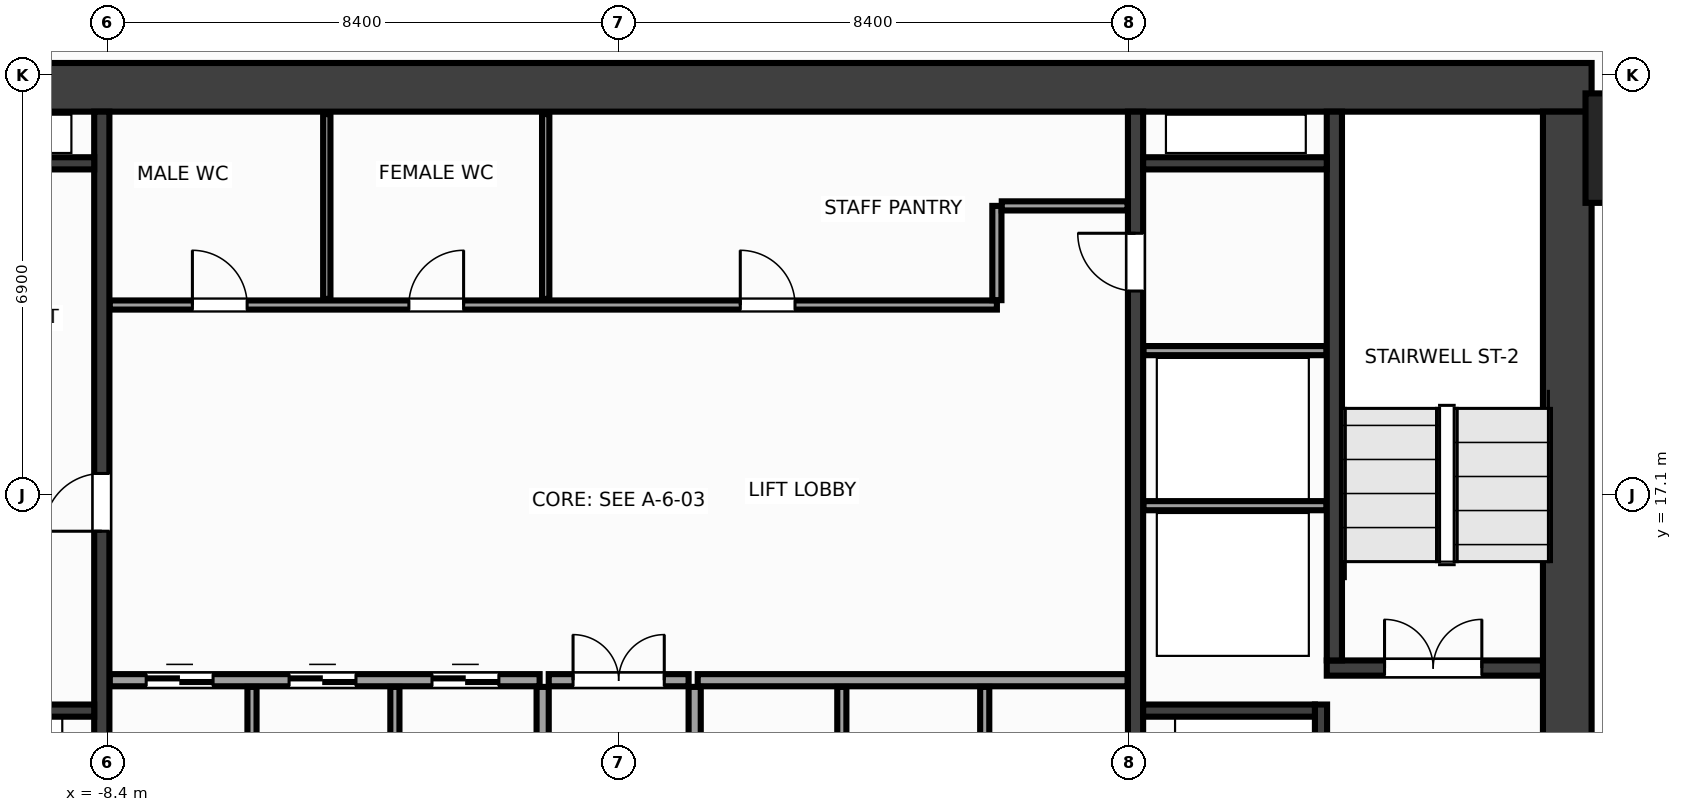
"""IFC4 building model, lengths in metres.
Left out: names, types, materials, properties, quantities, classifications, styles, units other than length and angle.
Written with IfcOpenShell. Run it as: python <this file> out.ifc"""

import sys

from ifc_helpers import new_model, si_unit, direction, frame, frame_2d, origin, origin_2d, place, context, subcontext, project, spatial, rectangle, extrude, source, transform, mapped, element, fill, save


model = new_model("IFC4")
c1 = context("Model", 3, precision=1e-05, world=origin(), true_north=direction((0.0, 1.0)))
c2 = subcontext(c1, "Body", "Model", "MODEL_VIEW")
j1 = project(units=[si_unit("LENGTHUNIT", "METRE"), si_unit("PLANEANGLEUNIT", "RADIAN")], contexts=[c1])
p1 = place(None, origin())
s1 = spatial("IfcSite", under=j1, at=p1, CompositionType="ELEMENT")
p2 = place(p1, origin())
s2 = spatial("IfcBuilding", under=s1, at=p2, CompositionType="ELEMENT")
p3 = place(p2, frame((0.0, 0.0, 66.8)))
s3 = spatial("IfcBuildingStorey", under=s2, at=p3, CompositionType="ELEMENT", Elevation=66.8)
m1 = source(origin(), c2, "Body", "SweptSolid", [
    extrude(rectangle(XDim=32.0, YDim=0.8, at=frame_2d((16.0, 0.0))), origin(), (0.0, 0.0, 1.0), 3.6),
])
p4 = place(p3, frame((-16.0, 23.8, 0.0), z_axis=(0.0, 0.0, 1.0), x_axis=(1.0, 0.0, 0.0)))
e1 = element("IfcWall", 1, at=p4, inside=s3, PredefinedType="SHEAR", context=c2, shape_type="MappedRepresentation", body=[
    mapped(m1, transform((0.0, 0.0, 0.0), x_axis=(1.0, 0.0, 0.0), y_axis=(0.0, 1.0, 0.0), z_axis=(0.0, 0.0, 1.0), scale=1.0)),
])
m2 = source(origin(), c2, "Body", "SweptSolid", [
    extrude(rectangle(XDim=12.8, YDim=0.8, at=frame_2d((6.4, 0.0))), origin(), (0.0, 0.0, 1.0), 3.6),
])
p5 = place(p3, frame((15.6, 10.6, 0.0), z_axis=(0.0, 0.0, 1.0), x_axis=(0.0, 1.0, 0.0)))
e2 = element("IfcWall", 2, at=p5, inside=s3, PredefinedType="SHEAR", context=c2, shape_type="MappedRepresentation", body=[
    mapped(m2, transform((0.0, 0.0, 0.0), x_axis=(1.0, 0.0, 0.0), y_axis=(0.0, 1.0, 0.0), z_axis=(0.0, 0.0, 1.0), scale=1.0)),
])
m3 = source(origin(), c2, "Body", "SweptSolid", [
    extrude(rectangle(XDim=12.8, YDim=0.25, at=frame_2d((6.4, 0.0))), origin(), (0.0, 0.0, 1.0), 3.6),
])
p6 = place(p3, frame((-8.5, 10.6, 0.0), z_axis=(0.0, 0.0, 1.0), x_axis=(0.0, 1.0, 0.0)))
e3 = element("IfcWall", 3, at=p6, inside=s3, PredefinedType="SHEAR", context=c2, shape_type="MappedRepresentation", body=[
    mapped(m3, transform((0.0, 0.0, 0.0), x_axis=(1.0, 0.0, 0.0), y_axis=(0.0, 1.0, 0.0), z_axis=(0.0, 0.0, 1.0), scale=1.0)),
])
p7 = place(p6, frame((5.9, 0.0, 0.0)))
e4 = element("IfcOpeningElement", 4, at=p7, cuts=e3, PredefinedType="OPENING", context=c2, shape_type="SweptSolid", body=[
    extrude(rectangle(XDim=0.95, YDim=2.15, at=frame_2d((0.475, 1.075))), frame((0.0, 0.137, 0.0), z_axis=(0.0, -1.0, 0.0), x_axis=(1.0, 0.0, 0.0)), (0.0, 0.0, 1.0), 0.274),
])
p8 = place(p3, frame((8.5, 10.6, 0.0), z_axis=(0.0, 0.0, 1.0), x_axis=(0.0, 1.0, 0.0)))
e5 = element("IfcWall", 5, at=p8, inside=s3, PredefinedType="SHEAR", context=c2, shape_type="MappedRepresentation", body=[
    mapped(m3, transform((0.0, 0.0, 0.0), x_axis=(1.0, 0.0, 0.0), y_axis=(0.0, 1.0, 0.0), z_axis=(0.0, 0.0, 1.0), scale=1.0)),
])
p9 = place(p8, frame((9.85, 0.0, 0.0)))
e6 = element("IfcOpeningElement", 6, at=p9, cuts=e5, PredefinedType="OPENING", context=c2, shape_type="SweptSolid", body=[
    extrude(rectangle(XDim=0.95, YDim=2.15, at=frame_2d((0.475, 1.075))), frame((0.0, 0.137, 0.0), z_axis=(0.0, -1.0, 0.0), x_axis=(1.0, 0.0, 0.0)), (0.0, 0.0, 1.0), 0.274),
])
m4 = source(origin(), c2, "Body", "SweptSolid", [
    extrude(rectangle(XDim=3.555, YDim=0.25, at=frame_2d((1.777, 0.0))), origin(), (0.0, 0.0, 1.0), 3.6),
])
p10 = place(p3, frame((11.645, 14.25, 0.0), z_axis=(0.0, 0.0, 1.0), x_axis=(1.0, 0.0, 0.0)))
e7 = element("IfcWall", 7, at=p10, inside=s3, PredefinedType="SHEAR", context=c2, shape_type="MappedRepresentation", body=[
    mapped(m4, transform((0.0, 0.0, 0.0), x_axis=(1.0, 0.0, 0.0), y_axis=(0.0, 1.0, 0.0), z_axis=(0.0, 0.0, 1.0), scale=1.0)),
])
p11 = place(p10, frame((0.95, 0.0, 0.0)))
e8 = element("IfcOpeningElement", 8, at=p11, cuts=e7, PredefinedType="OPENING", context=c2, shape_type="SweptSolid", body=[
    extrude(rectangle(XDim=1.6, YDim=2.15, at=frame_2d((0.8, 1.075))), frame((0.0, 0.137, 0.0), z_axis=(0.0, -1.0, 0.0), x_axis=(1.0, 0.0, 0.0)), (0.0, 0.0, 1.0), 0.274),
])
m5 = source(origin(), c2, "Body", "SweptSolid", [
    extrude(rectangle(XDim=9.025, YDim=0.25, at=frame_2d((4.512, 0.0))), origin(), (0.0, 0.0, 1.0), 3.6),
])
p12 = place(p3, frame((11.77, 14.375, 0.0), z_axis=(0.0, 0.0, 1.0), x_axis=(0.0, 1.0, 0.0)))
e9 = element("IfcWall", 9, at=p12, inside=s3, PredefinedType="SHEAR", context=c2, shape_type="MappedRepresentation", body=[
    mapped(m5, transform((0.0, 0.0, 0.0), x_axis=(1.0, 0.0, 0.0), y_axis=(0.0, 1.0, 0.0), z_axis=(0.0, 0.0, 1.0), scale=1.0)),
])
m6 = source(origin(), c2, "Body", "SweptSolid", [
    extrude(rectangle(XDim=2.825, YDim=0.2, at=frame_2d((1.413, 0.0))), origin(), (0.0, 0.0, 1.0), 3.6),
])
p13 = place(p3, frame((-11.45, 13.55, 0.0), z_axis=(0.0, 0.0, 1.0), x_axis=(1.0, 0.0, 0.0)))
e10 = element("IfcWall", 10, at=p13, inside=s3, PredefinedType="SHEAR", context=c2, shape_type="MappedRepresentation", body=[
    mapped(m6, transform((0.0, 0.0, 0.0), x_axis=(1.0, 0.0, 0.0), y_axis=(0.0, 1.0, 0.0), z_axis=(0.0, 0.0, 1.0), scale=1.0)),
])
m7 = source(origin(), c2, "Body", "SweptSolid", [
    extrude(rectangle(XDim=3.05, YDim=0.2, at=frame_2d((1.525, 0.0))), origin(), (0.0, 0.0, 1.0), 3.6),
])
p14 = place(p3, frame((11.55, 10.6, 0.0), z_axis=(0.0, 0.0, 1.0), x_axis=(0.0, 1.0, 0.0)))
e11 = element("IfcWall", 11, at=p14, inside=s3, PredefinedType="SHEAR", context=c2, shape_type="MappedRepresentation", body=[
    mapped(m7, transform((0.0, 0.0, 0.0), x_axis=(1.0, 0.0, 0.0), y_axis=(0.0, 1.0, 0.0), z_axis=(0.0, 0.0, 1.0), scale=1.0)),
])
p15 = place(p14, frame((0.9, 0.0, 0.0)))
e12 = element("IfcOpeningElement", 12, at=p15, cuts=e11, PredefinedType="OPENING", context=c2, shape_type="SweptSolid", body=[
    extrude(rectangle(XDim=1.1, YDim=2.15, at=frame_2d((0.55, 1.075))), frame((0.0, 0.112, 0.0), z_axis=(0.0, -1.0, 0.0), x_axis=(1.0, 0.0, 0.0)), (0.0, 0.0, 1.0), 0.224),
])
p16 = place(p3, frame((8.625, 13.55, 0.0), z_axis=(0.0, 0.0, 1.0), x_axis=(1.0, 0.0, 0.0)))
e13 = element("IfcWall", 13, at=p16, inside=s3, PredefinedType="SHEAR", context=c2, shape_type="MappedRepresentation", body=[
    mapped(m6, transform((0.0, 0.0, 0.0), x_axis=(1.0, 0.0, 0.0), y_axis=(0.0, 1.0, 0.0), z_axis=(0.0, 0.0, 1.0), scale=1.0)),
])
m8 = source(origin(), c2, "Body", "SweptSolid", [
    extrude(rectangle(XDim=3.02, YDim=0.2, at=frame_2d((1.51, 0.0))), origin(), (0.0, 0.0, 1.0), 3.6),
])
for number, where, z_axis, x_axis in (
    (14, (-11.645, 22.55, 0.0), (0.0, 0.0, 1.0), (1.0, 0.0, 0.0)),
    (15, (8.625, 22.55, 0.0), (0.0, 0.0, 1.0), (1.0, 0.0, 0.0)),
):
    element("IfcWall", number, at=place(p3, frame(where, z_axis=z_axis, x_axis=x_axis)), inside=s3, PredefinedType="SHEAR", context=c2, shape_type="MappedRepresentation", body=[
        mapped(m8, transform((0.0, 0.0, 0.0), x_axis=(1.0, 0.0, 0.0), y_axis=(0.0, 1.0, 0.0), z_axis=(0.0, 0.0, 1.0), scale=1.0)),
    ])
m9 = source(origin(), c2, "Body", "SweptSolid", [
    extrude(rectangle(XDim=1.8, YDim=1.8, at=origin_2d()), origin(), (0.0, 0.0, 1.0), 3.6),
])
p17 = place(p3, frame((16.8, 22.8, 0.0), z_axis=(0.0, 0.0, 1.0), x_axis=(1.0, 0.0, 0.0)))
e16 = element("IfcColumn", 16, at=p17, inside=s3, PredefinedType="COLUMN", context=c2, shape_type="MappedRepresentation", body=[
    mapped(m9, transform((0.0, 0.0, 0.0), x_axis=(1.0, 0.0, 0.0), y_axis=(0.0, 1.0, 0.0), z_axis=(0.0, 0.0, 1.0), scale=1.0)),
])
m10 = source(origin(), c2, "Body", "SweptSolid", [
    extrude(rectangle(XDim=3.01, YDim=0.15, at=frame_2d((1.505, 0.0))), origin(), (0.0, 0.0, 1.0), 3.3),
])
for number, where, z_axis, x_axis in (
    (17, (8.63, 16.92, 0.0), (0.0, 0.0, 1.0), (1.0, 0.0, 0.0)),
    (18, (8.63, 19.47, 0.0), (0.0, 0.0, 1.0), (1.0, 0.0, 0.0)),
):
    element("IfcWall", number, at=place(p3, frame(where, z_axis=z_axis, x_axis=x_axis)), inside=s3, PredefinedType="PARTITIONING", context=c2, shape_type="MappedRepresentation", body=[
        mapped(m10, transform((0.0, 0.0, 0.0), x_axis=(1.0, 0.0, 0.0), y_axis=(0.0, 1.0, 0.0), z_axis=(0.0, 0.0, 1.0), scale=1.0)),
    ])
m11 = source(origin(), c2, "Body", "SweptSolid", [
    extrude(rectangle(XDim=7.07, YDim=0.2, at=frame_2d((3.535, 0.0))), origin(), (0.0, 0.0, 1.0), 3.3),
])
p18 = place(p3, frame((-8.37, 14.05, 0.0), z_axis=(0.0, 0.0, 1.0), x_axis=(1.0, 0.0, 0.0)))
e19 = element("IfcWall", 19, at=p18, inside=s3, PredefinedType="PARTITIONING", context=c2, shape_type="MappedRepresentation", body=[
    mapped(m11, transform((0.0, 0.0, 0.0), x_axis=(1.0, 0.0, 0.0), y_axis=(0.0, 1.0, 0.0), z_axis=(0.0, 0.0, 1.0), scale=1.0)),
])
p19 = place(p18, frame((0.6, 0.0, 0.0)))
e20 = element("IfcOpeningElement", 20, at=p19, cuts=e19, PredefinedType="OPENING", context=c2, shape_type="SweptSolid", body=[
    extrude(rectangle(XDim=1.1, YDim=2.15, at=frame_2d((0.55, 1.075))), frame((0.0, 0.112, 0.0), z_axis=(0.0, -1.0, 0.0), x_axis=(1.0, 0.0, 0.0)), (0.0, 0.0, 1.0), 0.224),
])
p20 = place(p18, frame((2.95, 0.0, 0.0)))
e21 = element("IfcOpeningElement", 21, at=p20, cuts=e19, PredefinedType="OPENING", context=c2, shape_type="SweptSolid", body=[
    extrude(rectangle(XDim=1.1, YDim=2.15, at=frame_2d((0.55, 1.075))), frame((0.0, 0.112, 0.0), z_axis=(0.0, -1.0, 0.0), x_axis=(1.0, 0.0, 0.0)), (0.0, 0.0, 1.0), 0.224),
])
p21 = place(p18, frame((5.3, 0.0, 0.0)))
e22 = element("IfcOpeningElement", 22, at=p21, cuts=e19, PredefinedType="OPENING", context=c2, shape_type="SweptSolid", body=[
    extrude(rectangle(XDim=1.1, YDim=2.15, at=frame_2d((0.55, 1.075))), frame((0.0, 0.112, 0.0), z_axis=(0.0, -1.0, 0.0), x_axis=(1.0, 0.0, 0.0)), (0.0, 0.0, 1.0), 0.224),
])
p22 = place(p3, frame((1.3, 14.05, 0.0), z_axis=(0.0, 0.0, 1.0), x_axis=(1.0, 0.0, 0.0)))
e23 = element("IfcWall", 23, at=p22, inside=s3, PredefinedType="PARTITIONING", context=c2, shape_type="MappedRepresentation", body=[
    mapped(m11, transform((0.0, 0.0, 0.0), x_axis=(1.0, 0.0, 0.0), y_axis=(0.0, 1.0, 0.0), z_axis=(0.0, 0.0, 1.0), scale=1.0)),
])
m12 = source(origin(), c2, "Body", "SweptSolid", [
    extrude(rectangle(XDim=3.34, YDim=0.2, at=frame_2d((1.67, 0.0))), origin(), (0.0, 0.0, 1.0), 3.3),
])
for number, where, z_axis, x_axis in (
    (24, (-1.25, 10.6, 0.0), (0.0, 0.0, 1.0), (0.0, 1.0, 0.0)),
    (25, (1.25, 10.6, 0.0), (0.0, 0.0, 1.0), (0.0, 1.0, 0.0)),
):
    element("IfcWall", number, at=place(p3, frame(where, z_axis=z_axis, x_axis=x_axis)), inside=s3, PredefinedType="PARTITIONING", context=c2, shape_type="MappedRepresentation", body=[
        mapped(m12, transform((0.0, 0.0, 0.0), x_axis=(1.0, 0.0, 0.0), y_axis=(0.0, 1.0, 0.0), z_axis=(0.0, 0.0, 1.0), scale=1.0)),
    ])
m13 = source(origin(), c2, "Body", "SweptSolid", [
    extrude(rectangle(XDim=2.3, YDim=0.2, at=frame_2d((1.15, 0.0))), origin(), (0.0, 0.0, 1.0), 3.3),
])
p23 = place(p3, frame((-1.15, 14.05, 0.0), z_axis=(0.0, 0.0, 1.0), x_axis=(1.0, 0.0, 0.0)))
e26 = element("IfcWall", 26, at=p23, inside=s3, PredefinedType="PARTITIONING", context=c2, shape_type="MappedRepresentation", body=[
    mapped(m13, transform((0.0, 0.0, 0.0), x_axis=(1.0, 0.0, 0.0), y_axis=(0.0, 1.0, 0.0), z_axis=(0.0, 0.0, 1.0), scale=1.0)),
])
p24 = place(p23, frame((0.4, 0.0, 0.0)))
e27 = element("IfcOpeningElement", 27, at=p24, cuts=e26, PredefinedType="OPENING", context=c2, shape_type="SweptSolid", body=[
    extrude(rectangle(XDim=1.5, YDim=2.2, at=frame_2d((0.75, 1.1))), frame((0.0, 0.112, 0.0), z_axis=(0.0, -1.0, 0.0), x_axis=(1.0, 0.0, 0.0)), (0.0, 0.0, 1.0), 0.224),
])
m14 = source(origin(), c2, "Body", "SweptSolid", [
    extrude(rectangle(XDim=14.59, YDim=0.15, at=frame_2d((7.295, 0.0))), origin(), (0.0, 0.0, 1.0), 3.3),
])
p25 = place(p3, frame((-8.37, 20.22, 0.0), z_axis=(0.0, 0.0, 1.0), x_axis=(1.0, 0.0, 0.0)))
e28 = element("IfcWall", 28, at=p25, inside=s3, PredefinedType="PARTITIONING", context=c2, shape_type="MappedRepresentation", body=[
    mapped(m14, transform((0.0, 0.0, 0.0), x_axis=(1.0, 0.0, 0.0), y_axis=(0.0, 1.0, 0.0), z_axis=(0.0, 0.0, 1.0), scale=1.0)),
])
p26 = place(p25, frame((1.36, 0.0, 0.0)))
e29 = element("IfcOpeningElement", 29, at=p26, cuts=e28, PredefinedType="OPENING", context=c2, shape_type="SweptSolid", body=[
    extrude(rectangle(XDim=0.9, YDim=2.15, at=frame_2d((0.45, 1.075))), frame((0.0, 0.087, 0.0), z_axis=(0.0, -1.0, 0.0), x_axis=(1.0, 0.0, 0.0)), (0.0, 0.0, 1.0), 0.174),
])
p27 = place(p25, frame((4.92, 0.0, 0.0)))
e30 = element("IfcOpeningElement", 30, at=p27, cuts=e28, PredefinedType="OPENING", context=c2, shape_type="SweptSolid", body=[
    extrude(rectangle(XDim=0.9, YDim=2.15, at=frame_2d((0.45, 1.075))), frame((0.0, 0.087, 0.0), z_axis=(0.0, -1.0, 0.0), x_axis=(1.0, 0.0, 0.0)), (0.0, 0.0, 1.0), 0.174),
])
p28 = place(p25, frame((10.37, 0.0, 0.0)))
e31 = element("IfcOpeningElement", 31, at=p28, cuts=e28, PredefinedType="OPENING", context=c2, shape_type="SweptSolid", body=[
    extrude(rectangle(XDim=0.9, YDim=2.15, at=frame_2d((0.45, 1.075))), frame((0.0, 0.087, 0.0), z_axis=(0.0, -1.0, 0.0), x_axis=(1.0, 0.0, 0.0)), (0.0, 0.0, 1.0), 0.174),
])
m15 = source(origin(), c2, "Body", "SweptSolid", [
    extrude(rectangle(XDim=1.55, YDim=0.15, at=frame_2d((0.775, 0.0))), origin(), (0.0, 0.0, 1.0), 3.3),
])
p29 = place(p3, frame((6.22, 20.3, 0.0), z_axis=(0.0, 0.0, 1.0), x_axis=(0.0, 1.0, 0.0)))
e32 = element("IfcWall", 32, at=p29, inside=s3, PredefinedType="PARTITIONING", context=c2, shape_type="MappedRepresentation", body=[
    mapped(m15, transform((0.0, 0.0, 0.0), x_axis=(1.0, 0.0, 0.0), y_axis=(0.0, 1.0, 0.0), z_axis=(0.0, 0.0, 1.0), scale=1.0)),
])
m16 = source(origin(), c2, "Body", "SweptSolid", [
    extrude(rectangle(XDim=2.07, YDim=0.15, at=frame_2d((1.035, 0.0))), origin(), (0.0, 0.0, 1.0), 3.3),
])
p30 = place(p3, frame((6.3, 21.85, 0.0), z_axis=(0.0, 0.0, 1.0), x_axis=(1.0, 0.0, 0.0)))
e33 = element("IfcWall", 33, at=p30, inside=s3, PredefinedType="PARTITIONING", context=c2, shape_type="MappedRepresentation", body=[
    mapped(m16, transform((0.0, 0.0, 0.0), x_axis=(1.0, 0.0, 0.0), y_axis=(0.0, 1.0, 0.0), z_axis=(0.0, 0.0, 1.0), scale=1.0)),
])
m17 = source(origin(), c2, "Body", "SweptSolid", [
    extrude(rectangle(XDim=3.34, YDim=0.15, at=frame_2d((1.67, 0.0))), origin(), (0.0, 0.0, 1.0), 3.3),
])
for number, where, z_axis, x_axis in (
    (34, (-6.03, 10.6, 0.0), (0.0, 0.0, 1.0), (0.0, 1.0, 0.0)),
    (35, (-3.68, 10.6, 0.0), (0.0, 0.0, 1.0), (0.0, 1.0, 0.0)),
    (36, (3.67, 10.6, 0.0), (0.0, 0.0, 1.0), (0.0, 1.0, 0.0)),
    (37, (6.02, 10.6, 0.0), (0.0, 0.0, 1.0), (0.0, 1.0, 0.0)),
):
    element("IfcWall", number, at=place(p3, frame(where, z_axis=z_axis, x_axis=x_axis)), inside=s3, PredefinedType="PARTITIONING", context=c2, shape_type="MappedRepresentation", body=[
        mapped(m17, transform((0.0, 0.0, 0.0), x_axis=(1.0, 0.0, 0.0), y_axis=(0.0, 1.0, 0.0), z_axis=(0.0, 0.0, 1.0), scale=1.0)),
    ])
m18 = source(origin(), c2, "Body", "SweptSolid", [
    extrude(rectangle(XDim=3.04, YDim=0.12, at=frame_2d((1.52, 0.0))), origin(), (0.0, 0.0, 1.0), 3.3),
])
for number, where, z_axis, x_axis in (
    (38, (-4.8, 20.32, 0.0), (0.0, 0.0, 1.0), (0.0, 1.0, 0.0)),
    (39, (-1.2, 20.32, 0.0), (0.0, 0.0, 1.0), (0.0, 1.0, 0.0)),
):
    element("IfcWall", number, at=place(p3, frame(where, z_axis=z_axis, x_axis=x_axis)), inside=s3, PredefinedType="PARTITIONING", context=c2, shape_type="MappedRepresentation", body=[
        mapped(m18, transform((0.0, 0.0, 0.0), x_axis=(1.0, 0.0, 0.0), y_axis=(0.0, 1.0, 0.0), z_axis=(0.0, 0.0, 1.0), scale=1.0)),
    ])
m19 = source(origin(), c2, "Body", "SweptSolid", [
    extrude(rectangle(XDim=1.6, YDim=2.15, at=frame_2d((0.8, 1.075))), frame((0.0, 0.025, 0.0), z_axis=(0.0, -1.0, 0.0), x_axis=(1.0, 0.0, 0.0)), (0.0, 0.0, 1.0), 0.05),
])
p31 = place(p11, origin())
e40 = element("IfcDoor", 40, at=p31, inside=s3, OperationType="DOUBLE_DOOR_SINGLE_SWING", PredefinedType="DOOR", context=c2, shape_type="MappedRepresentation", body=[
    mapped(m19, transform((0.0, 0.0, 0.0), x_axis=(1.0, 0.0, 0.0), y_axis=(0.0, 1.0, 0.0), z_axis=(0.0, 0.0, 1.0), scale=1.0)),
])
fill(e8, e40)
m20 = source(origin(), c2, "Body", "SweptSolid", [
    extrude(rectangle(XDim=0.95, YDim=2.15, at=frame_2d((0.475, 1.075))), frame((0.0, 0.025, 0.0), z_axis=(0.0, -1.0, 0.0), x_axis=(1.0, 0.0, 0.0)), (0.0, 0.0, 1.0), 0.05),
])
p32 = place(p7, origin())
e41 = element("IfcDoor", 41, at=p32, inside=s3, OperationType="SINGLE_SWING_LEFT", PredefinedType="DOOR", context=c2, shape_type="MappedRepresentation", body=[
    mapped(m20, transform((0.0, 0.0, 0.0), x_axis=(1.0, 0.0, 0.0), y_axis=(0.0, 1.0, 0.0), z_axis=(0.0, 0.0, 1.0), scale=1.0)),
])
fill(e4, e41)
m21 = source(origin(), c2, "Body", "SweptSolid", [
    extrude(rectangle(XDim=0.95, YDim=2.15, at=frame_2d((0.475, 1.075))), frame((0.0, 0.025, 0.0), z_axis=(0.0, -1.0, 0.0), x_axis=(1.0, 0.0, 0.0)), (0.0, 0.0, 1.0), 0.05),
])
p33 = place(p9, origin())
e42 = element("IfcDoor", 42, at=p33, inside=s3, OperationType="SINGLE_SWING_RIGHT", PredefinedType="DOOR", context=c2, shape_type="MappedRepresentation", body=[
    mapped(m21, transform((0.0, 0.0, 0.0), x_axis=(1.0, 0.0, 0.0), y_axis=(0.0, 1.0, 0.0), z_axis=(0.0, 0.0, 1.0), scale=1.0)),
])
fill(e6, e42)
m22 = source(origin(), c2, "Body", "SweptSolid", [
    extrude(rectangle(XDim=1.1, YDim=2.15, at=frame_2d((0.55, 1.075))), frame((0.0, 0.025, 0.0), z_axis=(0.0, -1.0, 0.0), x_axis=(1.0, 0.0, 0.0)), (0.0, 0.0, 1.0), 0.05),
])
p34 = place(p19, origin())
e43 = element("IfcDoor", 43, at=p34, inside=s3, OperationType="DOUBLE_DOOR_SLIDING", PredefinedType="DOOR", context=c2, shape_type="MappedRepresentation", body=[
    mapped(m22, transform((0.0, 0.0, 0.0), x_axis=(1.0, 0.0, 0.0), y_axis=(0.0, 1.0, 0.0), z_axis=(0.0, 0.0, 1.0), scale=1.0)),
])
fill(e20, e43)
p35 = place(p20, origin())
e44 = element("IfcDoor", 44, at=p35, inside=s3, OperationType="DOUBLE_DOOR_SLIDING", PredefinedType="DOOR", context=c2, shape_type="MappedRepresentation", body=[
    mapped(m22, transform((0.0, 0.0, 0.0), x_axis=(1.0, 0.0, 0.0), y_axis=(0.0, 1.0, 0.0), z_axis=(0.0, 0.0, 1.0), scale=1.0)),
])
fill(e21, e44)
p36 = place(p21, origin())
e45 = element("IfcDoor", 45, at=p36, inside=s3, OperationType="DOUBLE_DOOR_SLIDING", PredefinedType="DOOR", context=c2, shape_type="MappedRepresentation", body=[
    mapped(m22, transform((0.0, 0.0, 0.0), x_axis=(1.0, 0.0, 0.0), y_axis=(0.0, 1.0, 0.0), z_axis=(0.0, 0.0, 1.0), scale=1.0)),
])
fill(e22, e45)
m23 = source(origin(), c2, "Body", "SweptSolid", [
    extrude(rectangle(XDim=1.5, YDim=2.2, at=frame_2d((0.75, 1.1))), frame((0.0, 0.025, 0.0), z_axis=(0.0, -1.0, 0.0), x_axis=(1.0, 0.0, 0.0)), (0.0, 0.0, 1.0), 0.05),
])
p37 = place(p24, origin())
e46 = element("IfcDoor", 46, at=p37, inside=s3, OperationType="DOUBLE_DOOR_SINGLE_SWING", PredefinedType="DOOR", context=c2, shape_type="MappedRepresentation", body=[
    mapped(m23, transform((0.0, 0.0, 0.0), x_axis=(1.0, 0.0, 0.0), y_axis=(0.0, 1.0, 0.0), z_axis=(0.0, 0.0, 1.0), scale=1.0)),
])
fill(e27, e46)
m24 = source(origin(), c2, "Body", "SweptSolid", [
    extrude(rectangle(XDim=0.9, YDim=2.15, at=frame_2d((0.45, 1.075))), frame((0.0, 0.025, 0.0), z_axis=(0.0, -1.0, 0.0), x_axis=(1.0, 0.0, 0.0)), (0.0, 0.0, 1.0), 0.05),
])
p38 = place(p26, origin())
e47 = element("IfcDoor", 47, at=p38, inside=s3, OperationType="SINGLE_SWING_LEFT", PredefinedType="DOOR", context=c2, shape_type="MappedRepresentation", body=[
    mapped(m24, transform((0.0, 0.0, 0.0), x_axis=(1.0, 0.0, 0.0), y_axis=(0.0, 1.0, 0.0), z_axis=(0.0, 0.0, 1.0), scale=1.0)),
])
fill(e29, e47)
p39 = place(p27, origin())
e48 = element("IfcDoor", 48, at=p39, inside=s3, OperationType="SINGLE_SWING_RIGHT", PredefinedType="DOOR", context=c2, shape_type="MappedRepresentation", body=[
    mapped(m24, transform((0.0, 0.0, 0.0), x_axis=(1.0, 0.0, 0.0), y_axis=(0.0, 1.0, 0.0), z_axis=(0.0, 0.0, 1.0), scale=1.0)),
])
fill(e30, e48)
p40 = place(p28, origin())
e49 = element("IfcDoor", 49, at=p40, inside=s3, OperationType="SINGLE_SWING_LEFT", PredefinedType="DOOR", context=c2, shape_type="MappedRepresentation", body=[
    mapped(m24, transform((0.0, 0.0, 0.0), x_axis=(1.0, 0.0, 0.0), y_axis=(0.0, 1.0, 0.0), z_axis=(0.0, 0.0, 1.0), scale=1.0)),
])
fill(e31, e49)
save(model, sys.argv[1])
